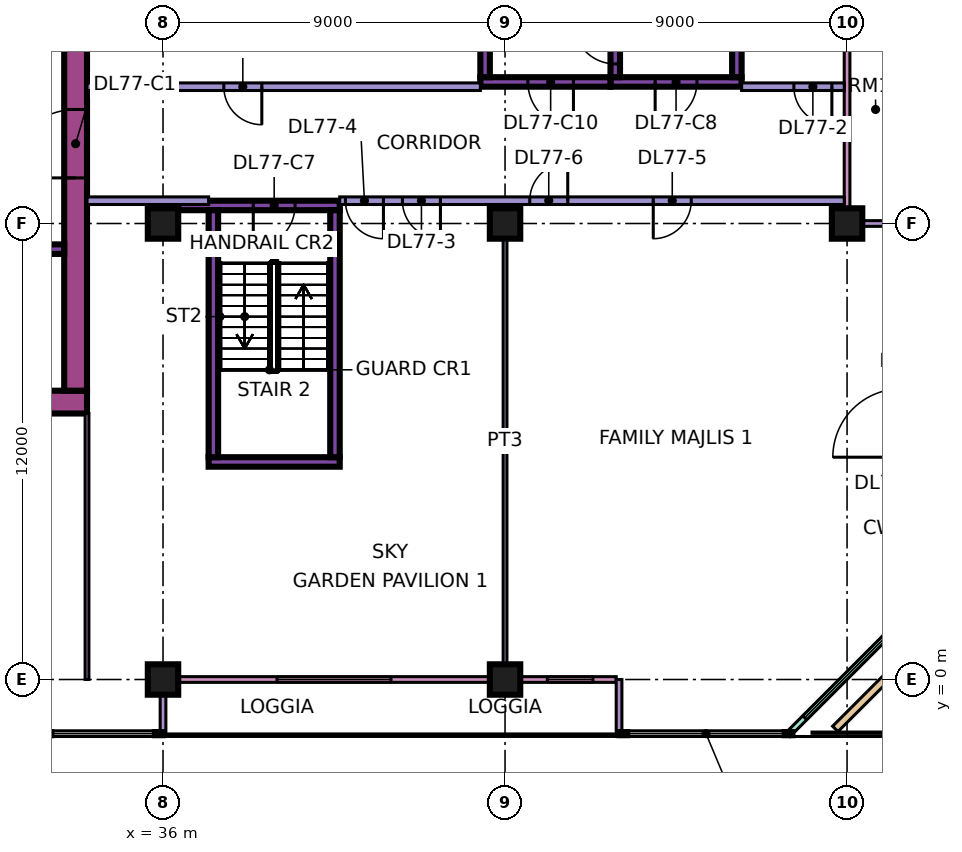
"""IFC4 building model, lengths in metres.
Left out: names, types, materials, properties, quantities, classifications, styles, units other than length and angle.
Written with IfcOpenShell. Run it as: python <this file> out.ifc"""

import sys

from ifc_helpers import new_model, si_unit, direction, frame, frame_2d, origin, origin_2d, place, context, subcontext, project, spatial, rectangle, extrude, element, fill, save


model = new_model("IFC4")
c1 = context("Model", 3, precision=1e-05, world=origin(), true_north=direction((0.0, 1.0)))
c2 = subcontext(c1, "Body", "Model", "MODEL_VIEW")
j1 = project(units=[si_unit("LENGTHUNIT", "METRE"), si_unit("PLANEANGLEUNIT", "RADIAN")], contexts=[c1])
p1 = place(None, origin())
s1 = spatial("IfcSite", under=j1, at=p1, CompositionType="ELEMENT")
p2 = place(p1, origin())
s2 = spatial("IfcBuilding", under=s1, at=p2, CompositionType="ELEMENT")
p3 = place(p2, frame((0.0, 0.0, 327.65)))
s3 = spatial("IfcBuildingStorey", under=s2, at=p3, CompositionType="ELEMENT", Elevation=327.65)
for number, where, z_axis, x_axis in (
    (1, (36.0, 0.0, 0.0), (0.0, 0.0, 1.0), (1.0, 0.0, 0.0)),
    (2, (36.0, 12.0, 0.0), (0.0, 0.0, 1.0), (1.0, 0.0, 0.0)),
    (3, (45.0, 0.0, 0.0), (0.0, 0.0, 1.0), (1.0, 0.0, 0.0)),
    (4, (45.0, 12.0, 0.0), (0.0, 0.0, 1.0), (1.0, 0.0, 0.0)),
    (5, (54.0, 12.0, 0.0), (0.0, 0.0, 1.0), (1.0, 0.0, 0.0)),
):
    element("IfcColumn", number, at=place(p3, frame(where, z_axis=z_axis, x_axis=x_axis)), inside=s3, PredefinedType="COLUMN", context=c2, shape_type="SweptSolid", body=[
        extrude(rectangle(XDim=0.8, YDim=0.8, at=origin_2d()), origin(), (0.0, 0.0, 1.0), 11.25),
    ])
p4 = place(p3, frame((9.0, 7.3, 0.0), z_axis=(0.0, 0.0, 1.0), x_axis=(1.0, 0.0, 0.0)))
e6 = element("IfcWall", 6, at=p4, inside=s3, PredefinedType="SHEAR", context=c2, shape_type="SweptSolid", body=[
    extrude(rectangle(XDim=25.0, YDim=0.6, at=frame_2d((12.5, 0.0))), origin(), (0.0, 0.0, 1.0), 11.25),
])
p5 = place(p3, frame((33.7, 7.6, 0.0), z_axis=(0.0, 0.0, 1.0), x_axis=(0.0, 1.0, 0.0)))
e7 = element("IfcWall", 7, at=p5, inside=s3, PredefinedType="SHEAR", context=c2, shape_type="SweptSolid", body=[
    extrude(rectangle(XDim=11.8, YDim=0.6, at=frame_2d((5.9, 0.0))), origin(), (0.0, 0.0, 1.0), 11.25),
])
p6 = place(p5, frame((5.6, 0.0, 0.0)))
e8 = element("IfcOpeningElement", 8, at=p6, cuts=e7, PredefinedType="OPENING", context=c2, shape_type="SweptSolid", body=[
    extrude(rectangle(XDim=1.8, YDim=2.4, at=frame_2d((0.9, 1.2))), frame((0.0, 0.31, 0.0), z_axis=(0.0, -1.0, 0.0), x_axis=(1.0, 0.0, 0.0)), (0.0, 0.0, 1.0), 0.62),
])
p7 = place(p3, frame((13.45, 11.325, 0.0), z_axis=(0.0, 0.0, 1.0), x_axis=(1.0, 0.0, 0.0)))
e9 = element("IfcWall", 9, at=p7, inside=s3, PredefinedType="SHEAR", context=c2, shape_type="SweptSolid", body=[
    extrude(rectangle(XDim=19.95, YDim=0.25, at=frame_2d((9.975, 0.0))), origin(), (0.0, 0.0, 1.0), 11.25),
])
p8 = place(p7, frame((4.925, 0.0, 0.0)))
e10 = element("IfcOpeningElement", 10, at=p8, cuts=e9, PredefinedType="OPENING", context=c2, shape_type="SweptSolid", body=[
    extrude(rectangle(XDim=0.9, YDim=2.1, at=frame_2d((0.45, 1.05))), frame((0.0, 0.135, 0.0), z_axis=(0.0, -1.0, 0.0), x_axis=(1.0, 0.0, 0.0)), (0.0, 0.0, 1.0), 0.27),
])
p9 = place(p7, frame((12.3, 0.0, 0.0)))
e11 = element("IfcOpeningElement", 11, at=p9, cuts=e9, PredefinedType="OPENING", context=c2, shape_type="SweptSolid", body=[
    extrude(rectangle(XDim=0.9, YDim=2.1, at=frame_2d((0.45, 1.05))), frame((0.0, 0.135, 0.0), z_axis=(0.0, -1.0, 0.0), x_axis=(1.0, 0.0, 0.0)), (0.0, 0.0, 1.0), 0.27),
])
p10 = place(p7, frame((16.775, 0.0, 0.0)))
e12 = element("IfcOpeningElement", 12, at=p10, cuts=e9, PredefinedType="OPENING", context=c2, shape_type="SweptSolid", body=[
    extrude(rectangle(XDim=0.9, YDim=2.1, at=frame_2d((0.45, 1.05))), frame((0.0, 0.135, 0.0), z_axis=(0.0, -1.0, 0.0), x_axis=(1.0, 0.0, 0.0)), (0.0, 0.0, 1.0), 0.27),
])
p11 = place(p3, frame((37.2, 5.725, 0.0), z_axis=(0.0, 0.0, 1.0), x_axis=(1.0, 0.0, 0.0)))
e13 = element("IfcWall", 13, at=p11, inside=s3, PredefinedType="SHEAR", context=c2, shape_type="SweptSolid", body=[
    extrude(rectangle(XDim=3.45, YDim=0.25, at=frame_2d((1.725, 0.0))), origin(), (0.0, 0.0, 1.0), 11.25),
])
p12 = place(p3, frame((36.4, 12.475, 0.0), z_axis=(0.0, 0.0, 1.0), x_axis=(1.0, 0.0, 0.0)))
e14 = element("IfcWall", 14, at=p12, inside=s3, PredefinedType="SHEAR", context=c2, shape_type="SweptSolid", body=[
    extrude(rectangle(XDim=4.25, YDim=0.25, at=frame_2d((2.125, 0.0))), origin(), (0.0, 0.0, 1.0), 11.25),
])
p13 = place(p12, frame((1.975, 0.0, 0.0)))
e15 = element("IfcOpeningElement", 15, at=p13, cuts=e14, PredefinedType="OPENING", context=c2, shape_type="SweptSolid", body=[
    extrude(rectangle(XDim=1.1, YDim=2.2, at=frame_2d((0.55, 1.1))), frame((0.0, 0.135, 0.0), z_axis=(0.0, -1.0, 0.0), x_axis=(1.0, 0.0, 0.0)), (0.0, 0.0, 1.0), 0.27),
])
for number, where, z_axis, x_axis in (
    (16, (37.325, 5.85, 0.0), (0.0, 0.0, 1.0), (0.0, 1.0, 0.0)),
    (17, (40.525, 5.85, 0.0), (0.0, 0.0, 1.0), (0.0, 1.0, 0.0)),
):
    element("IfcWall", number, at=place(p3, frame(where, z_axis=z_axis, x_axis=x_axis)), inside=s3, PredefinedType="SHEAR", context=c2, shape_type="SweptSolid", body=[
        extrude(rectangle(XDim=6.5, YDim=0.25, at=frame_2d((3.25, 0.0))), origin(), (0.0, 0.0, 1.0), 11.25),
    ])
p14 = place(p3, frame((47.775, 15.725, 0.0), z_axis=(0.0, 0.0, 1.0), x_axis=(1.0, 0.0, 0.0)))
e18 = element("IfcWall", 18, at=p14, inside=s3, PredefinedType="SHEAR", context=c2, shape_type="SweptSolid", body=[
    extrude(rectangle(XDim=3.45, YDim=0.25, at=frame_2d((1.725, 0.0))), origin(), (0.0, 0.0, 1.0), 11.25),
])
p15 = place(p14, frame((1.175, 0.0, 0.0)))
e19 = element("IfcOpeningElement", 19, at=p15, cuts=e18, PredefinedType="OPENING", context=c2, shape_type="SweptSolid", body=[
    extrude(rectangle(XDim=1.1, YDim=2.2, at=frame_2d((0.55, 1.1))), frame((0.0, 0.135, 0.0), z_axis=(0.0, -1.0, 0.0), x_axis=(1.0, 0.0, 0.0)), (0.0, 0.0, 1.0), 0.27),
])
p16 = place(p3, frame((47.9, 15.85, 0.0), z_axis=(0.0, 0.0, 1.0), x_axis=(0.0, 1.0, 0.0)))
e20 = element("IfcWall", 20, at=p16, inside=s3, PredefinedType="SHEAR", context=c2, shape_type="SweptSolid", body=[
    extrude(rectangle(XDim=6.5, YDim=0.25, at=frame_2d((3.25, 0.0))), origin(), (0.0, 0.0, 1.0), 11.25),
])
p17 = place(p16, frame((0.35, 0.0, 0.0)))
e21 = element("IfcOpeningElement", 21, at=p17, cuts=e20, PredefinedType="OPENING", context=c2, shape_type="SweptSolid", body=[
    extrude(rectangle(XDim=1.1, YDim=2.2, at=frame_2d((0.55, 1.1))), frame((0.0, 0.135, 0.0), z_axis=(0.0, -1.0, 0.0), x_axis=(1.0, 0.0, 0.0)), (0.0, 0.0, 1.0), 0.27),
])
p18 = place(p3, frame((51.1, 15.85, 0.0), z_axis=(0.0, 0.0, 1.0), x_axis=(0.0, 1.0, 0.0)))
e22 = element("IfcWall", 22, at=p18, inside=s3, PredefinedType="SHEAR", context=c2, shape_type="SweptSolid", body=[
    extrude(rectangle(XDim=6.5, YDim=0.25, at=frame_2d((3.25, 0.0))), origin(), (0.0, 0.0, 1.0), 11.25),
])
p19 = place(p3, frame((44.35, 15.725, 0.0), z_axis=(0.0, 0.0, 1.0), x_axis=(1.0, 0.0, 0.0)))
e23 = element("IfcWall", 23, at=p19, inside=s3, PredefinedType="SHEAR", context=c2, shape_type="SweptSolid", body=[
    extrude(rectangle(XDim=3.425, YDim=0.25, at=frame_2d((1.712, 0.0))), origin(), (0.0, 0.0, 1.0), 11.25),
])
p20 = place(p19, frame((1.25, 0.0, 0.0)))
e24 = element("IfcOpeningElement", 24, at=p20, cuts=e23, PredefinedType="OPENING", context=c2, shape_type="SweptSolid", body=[
    extrude(rectangle(XDim=1.2, YDim=2.2, at=frame_2d((0.6, 1.1))), frame((0.0, 0.135, 0.0), z_axis=(0.0, -1.0, 0.0), x_axis=(1.0, 0.0, 0.0)), (0.0, 0.0, 1.0), 0.27),
])
p21 = place(p3, frame((44.475, 15.85, 0.0), z_axis=(0.0, 0.0, 1.0), x_axis=(0.0, 1.0, 0.0)))
e25 = element("IfcWall", 25, at=p21, inside=s3, PredefinedType="SHEAR", context=c2, shape_type="SweptSolid", body=[
    extrude(rectangle(XDim=6.5, YDim=0.25, at=frame_2d((3.25, 0.0))), origin(), (0.0, 0.0, 1.0), 11.25),
])
p22 = place(p21, frame((1.75, 0.0, 0.0)))
e26 = element("IfcOpeningElement", 26, at=p22, cuts=e25, PredefinedType="OPENING", context=c2, shape_type="SweptSolid", body=[
    extrude(rectangle(XDim=1.1, YDim=2.2, at=frame_2d((0.55, 1.1))), frame((0.0, 0.135, 0.0), z_axis=(0.0, -1.0, 0.0), x_axis=(1.0, 0.0, 0.0)), (0.0, 0.0, 1.0), 0.27),
])
p23 = place(p21, frame((4.3, 0.0, 0.0)))
e27 = element("IfcOpeningElement", 27, at=p23, cuts=e25, PredefinedType="OPENING", context=c2, shape_type="SweptSolid", body=[
    extrude(rectangle(XDim=1.1, YDim=2.2, at=frame_2d((0.55, 1.1))), frame((0.0, 0.135, 0.0), z_axis=(0.0, -1.0, 0.0), x_axis=(1.0, 0.0, 0.0)), (0.0, 0.0, 1.0), 0.27),
])
p24 = place(p3, frame((36.075, 0.0, 0.0), z_axis=(0.0, 0.0, 1.0), x_axis=(1.0, 0.0, 0.0)))
e28 = element("IfcWall", 28, at=p24, inside=s3, PredefinedType="SOLIDWALL", context=c2, shape_type="SweptSolid", body=[
    extrude(rectangle(XDim=11.85, YDim=0.15, at=frame_2d((5.925, 0.0))), origin(), (0.0, 0.0, 1.0), 10.85),
])
p25 = place(p24, frame((2.925, 0.0, 0.45)))
e29 = element("IfcOpeningElement", 29, at=p25, cuts=e28, PredefinedType="OPENING", context=c2, shape_type="SweptSolid", body=[
    extrude(rectangle(XDim=3.0, YDim=9.8, at=frame_2d((1.5, 4.9))), frame((0.0, 0.085, 0.0), z_axis=(0.0, -1.0, 0.0), x_axis=(1.0, 0.0, 0.0)), (0.0, 0.0, 1.0), 0.17),
])
p26 = place(p24, frame((10.038, 0.0, 0.45)))
e30 = element("IfcOpeningElement", 30, at=p26, cuts=e28, PredefinedType="OPENING", context=c2, shape_type="SweptSolid", body=[
    extrude(rectangle(XDim=1.2, YDim=9.8, at=frame_2d((0.6, 4.9))), frame((0.0, 0.085, 0.0), z_axis=(0.0, -1.0, 0.0), x_axis=(1.0, 0.0, 0.0)), (0.0, 0.0, 1.0), 0.17),
])
for number, where, z_axis, x_axis in (
    (31, (36.0, -1.5, 0.0), (0.0, 0.0, 1.0), (0.0, 1.0, 0.0)),
    (32, (48.0, -1.5, 0.0), (0.0, 0.0, 1.0), (0.0, 1.0, 0.0)),
):
    element("IfcWall", number, at=place(p3, frame(where, z_axis=z_axis, x_axis=x_axis)), inside=s3, PredefinedType="SOLIDWALL", context=c2, shape_type="SweptSolid", body=[
        extrude(rectangle(XDim=1.5, YDim=0.15, at=frame_2d((0.75, 0.0))), origin(), (0.0, 0.0, 1.0), 10.85),
    ])
p27 = place(p3, frame((52.447, -1.447, 0.0), z_axis=(0.0, 0.0, 1.0), x_axis=(0.707106781187, 0.707106781187, 0.0)))
e33 = element("IfcWall", 33, at=p27, inside=s3, PredefinedType="SOLIDWALL", context=c2, shape_type="SweptSolid", body=[
    extrude(rectangle(XDim=4.243, YDim=0.15, at=frame_2d((2.121, 0.0))), origin(), (0.0, 0.0, 1.0), 10.85),
])
p28 = place(p27, frame((0.621, 0.0, 0.45)))
e34 = element("IfcOpeningElement", 34, at=p28, cuts=e33, PredefinedType="OPENING", context=c2, shape_type="SweptSolid", body=[
    extrude(rectangle(XDim=3.0, YDim=9.8, at=frame_2d((1.5, 4.9))), frame((0.0, 0.085, 0.0), z_axis=(0.0, -1.0, 0.0), x_axis=(1.0, 0.0, 0.0)), (0.0, 0.0, 1.0), 0.17),
])
p29 = place(p3, frame((54.0, 12.075, 0.0), z_axis=(0.0, 0.0, 1.0), x_axis=(0.0, 1.0, 0.0)))
e35 = element("IfcWall", 35, at=p29, inside=s3, PredefinedType="SOLIDWALL", context=c2, shape_type="SweptSolid", body=[
    extrude(rectangle(XDim=10.35, YDim=0.15, at=frame_2d((5.175, 0.0))), origin(), (0.0, 0.0, 1.0), 10.85),
])
p30 = place(p29, frame((5.438, 0.0, 0.45)))
e36 = element("IfcOpeningElement", 36, at=p30, cuts=e35, PredefinedType="OPENING", context=c2, shape_type="SweptSolid", body=[
    extrude(rectangle(XDim=3.0, YDim=9.8, at=frame_2d((1.5, 4.9))), frame((0.0, 0.085, 0.0), z_axis=(0.0, -1.0, 0.0), x_axis=(1.0, 0.0, 0.0)), (0.0, 0.0, 1.0), 0.17),
])
p31 = place(p3, frame((55.5, 12.0, 0.0), z_axis=(0.0, 0.0, 1.0), x_axis=(-1.0, 0.0, 0.0)))
e37 = element("IfcWall", 37, at=p31, inside=s3, PredefinedType="SOLIDWALL", context=c2, shape_type="SweptSolid", body=[
    extrude(rectangle(XDim=1.5, YDim=0.15, at=frame_2d((0.75, 0.0))), origin(), (0.0, 0.0, 1.0), 10.85),
])
p32 = place(p3, frame((56.2, 1.21, 0.0), z_axis=(0.0, 0.0, 1.0), x_axis=(-0.707106781187, -0.707106781187, 0.0)))
e38 = element("IfcWall", 38, at=p32, inside=s3, PredefinedType="PARAPET", context=c2, shape_type="SweptSolid", body=[
    extrude(rectangle(XDim=3.55, YDim=0.2, at=frame_2d((1.775, 0.0))), origin(), (0.0, 0.0, 1.0), 0.5),
])
p33 = place(p3, frame((34.0, 0.0, 0.0), z_axis=(0.0, 0.0, 1.0), x_axis=(0.0, 1.0, 0.0)))
e39 = element("IfcWall", 39, at=p33, inside=s3, PredefinedType="PARTITIONING", context=c2, shape_type="SweptSolid", body=[
    extrude(rectangle(XDim=7.0, YDim=0.1, at=frame_2d((3.5, 0.0))), origin(), (0.0, 0.0, 1.0), 10.85),
])
p34 = place(p3, frame((34.0, 12.6, 0.0), z_axis=(0.0, 0.0, 1.0), x_axis=(1.0, 0.0, 0.0)))
e40 = element("IfcWall", 40, at=p34, inside=s3, PredefinedType="PARTITIONING", context=c2, shape_type="SweptSolid", body=[
    extrude(rectangle(XDim=3.2, YDim=0.2, at=frame_2d((1.6, 0.0))), origin(), (0.0, 0.0, 1.0), 10.85),
])
p35 = place(p3, frame((34.0, 15.6, 0.0), z_axis=(0.0, 0.0, 1.0), x_axis=(1.0, 0.0, 0.0)))
e41 = element("IfcWall", 41, at=p35, inside=s3, PredefinedType="PARTITIONING", context=c2, shape_type="SweptSolid", body=[
    extrude(rectangle(XDim=10.35, YDim=0.2, at=frame_2d((5.175, 0.0))), origin(), (0.0, 0.0, 1.0), 10.85),
])
p36 = place(p35, frame((3.6, 0.0, 0.0)))
e42 = element("IfcOpeningElement", 42, at=p36, cuts=e41, PredefinedType="OPENING", context=c2, shape_type="SweptSolid", body=[
    extrude(rectangle(XDim=1.0, YDim=2.1, at=frame_2d((0.5, 1.05))), frame((0.0, 0.11, 0.0), z_axis=(0.0, -1.0, 0.0), x_axis=(1.0, 0.0, 0.0)), (0.0, 0.0, 1.0), 0.22),
])
p37 = place(p3, frame((40.65, 12.6, 0.0), z_axis=(0.0, 0.0, 1.0), x_axis=(1.0, 0.0, 0.0)))
e43 = element("IfcWall", 43, at=p37, inside=s3, PredefinedType="PARTITIONING", context=c2, shape_type="SweptSolid", body=[
    extrude(rectangle(XDim=13.276, YDim=0.2, at=frame_2d((6.638, 0.0))), origin(), (0.0, 0.0, 1.0), 10.85),
])
p38 = place(p37, frame((1.65, 0.0, 0.0)))
e44 = element("IfcOpeningElement", 44, at=p38, cuts=e43, PredefinedType="OPENING", context=c2, shape_type="SweptSolid", body=[
    extrude(rectangle(XDim=1.0, YDim=2.1, at=frame_2d((0.5, 1.05))), frame((0.0, 0.11, 0.0), z_axis=(0.0, -1.0, 0.0), x_axis=(1.0, 0.0, 0.0)), (0.0, 0.0, 1.0), 0.22),
])
p39 = place(p37, frame((0.15, 0.0, 0.0)))
e45 = element("IfcOpeningElement", 45, at=p39, cuts=e43, PredefinedType="OPENING", context=c2, shape_type="SweptSolid", body=[
    extrude(rectangle(XDim=1.0, YDim=2.1, at=frame_2d((0.5, 1.05))), frame((0.0, 0.11, 0.0), z_axis=(0.0, -1.0, 0.0), x_axis=(1.0, 0.0, 0.0)), (0.0, 0.0, 1.0), 0.22),
])
p40 = place(p37, frame((8.25, 0.0, 0.0)))
e46 = element("IfcOpeningElement", 46, at=p40, cuts=e43, PredefinedType="OPENING", context=c2, shape_type="SweptSolid", body=[
    extrude(rectangle(XDim=1.0, YDim=2.1, at=frame_2d((0.5, 1.05))), frame((0.0, 0.11, 0.0), z_axis=(0.0, -1.0, 0.0), x_axis=(1.0, 0.0, 0.0)), (0.0, 0.0, 1.0), 0.22),
])
p41 = place(p37, frame((5.0, 0.0, 0.0)))
e47 = element("IfcOpeningElement", 47, at=p41, cuts=e43, PredefinedType="OPENING", context=c2, shape_type="SweptSolid", body=[
    extrude(rectangle(XDim=1.0, YDim=2.1, at=frame_2d((0.5, 1.05))), frame((0.0, 0.11, 0.0), z_axis=(0.0, -1.0, 0.0), x_axis=(1.0, 0.0, 0.0)), (0.0, 0.0, 1.0), 0.22),
])
p42 = place(p3, frame((45.0, 0.074, 0.0), z_axis=(0.0, 0.0, 1.0), x_axis=(0.0, 1.0, 0.0)))
e48 = element("IfcWall", 48, at=p42, inside=s3, PredefinedType="PARTITIONING", context=c2, shape_type="SweptSolid", body=[
    extrude(rectangle(XDim=12.426, YDim=0.1, at=frame_2d((6.213, 0.0))), origin(), (0.0, 0.0, 1.0), 10.85),
])
p43 = place(p3, frame((51.225, 15.6, 0.0), z_axis=(0.0, 0.0, 1.0), x_axis=(1.0, 0.0, 0.0)))
e49 = element("IfcWall", 49, at=p43, inside=s3, PredefinedType="PARTITIONING", context=c2, shape_type="SweptSolid", body=[
    extrude(rectangle(XDim=2.701, YDim=0.2, at=frame_2d((1.351, 0.0))), origin(), (0.0, 0.0, 1.0), 10.85),
])
p44 = place(p43, frame((1.375, 0.0, 0.0)))
e50 = element("IfcOpeningElement", 50, at=p44, cuts=e49, PredefinedType="OPENING", context=c2, shape_type="SweptSolid", body=[
    extrude(rectangle(XDim=1.0, YDim=2.1, at=frame_2d((0.5, 1.05))), frame((0.0, 0.11, 0.0), z_axis=(0.0, -1.0, 0.0), x_axis=(1.0, 0.0, 0.0)), (0.0, 0.0, 1.0), 0.22),
])
p45 = place(p25, origin())
e51 = element("IfcWindow", 51, at=p45, inside=s3, PartitioningType="SINGLE_PANEL", PredefinedType="WINDOW", context=c2, shape_type="SweptSolid", body=[
    extrude(rectangle(XDim=3.0, YDim=9.8, at=frame_2d((1.5, 4.9))), frame((0.0, 0.03, 0.0), z_axis=(0.0, -1.0, 0.0), x_axis=(1.0, 0.0, 0.0)), (0.0, 0.0, 1.0), 0.06),
])
fill(e29, e51)
p46 = place(p26, origin())
e52 = element("IfcWindow", 52, at=p46, inside=s3, PartitioningType="SINGLE_PANEL", PredefinedType="WINDOW", context=c2, shape_type="SweptSolid", body=[
    extrude(rectangle(XDim=1.2, YDim=9.8, at=frame_2d((0.6, 4.9))), frame((0.0, 0.03, 0.0), z_axis=(0.0, -1.0, 0.0), x_axis=(1.0, 0.0, 0.0)), (0.0, 0.0, 1.0), 0.06),
])
fill(e30, e52)
p47 = place(p28, origin())
e53 = element("IfcWindow", 53, at=p47, inside=s3, PartitioningType="SINGLE_PANEL", PredefinedType="WINDOW", context=c2, shape_type="SweptSolid", body=[
    extrude(rectangle(XDim=3.0, YDim=9.8, at=frame_2d((1.5, 4.9))), frame((0.0, 0.03, 0.0), z_axis=(0.0, -1.0, 0.0), x_axis=(1.0, 0.0, 0.0)), (0.0, 0.0, 1.0), 0.06),
])
fill(e34, e53)
p48 = place(p6, origin())
e54 = element("IfcDoor", 54, at=p48, inside=s3, OperationType="DOUBLE_DOOR_SINGLE_SWING", PredefinedType="DOOR", context=c2, shape_type="SweptSolid", body=[
    extrude(rectangle(XDim=1.8, YDim=2.4, at=frame_2d((0.9, 1.2))), frame((0.0, 0.025, 0.0), z_axis=(0.0, -1.0, 0.0), x_axis=(1.0, 0.0, 0.0)), (0.0, 0.0, 1.0), 0.05),
])
fill(e8, e54)
p49 = place(p13, frame((1.1, 0.0, 0.0), z_axis=(0.0, 0.0, 1.0), x_axis=(-1.0, 0.0, 0.0)))
e55 = element("IfcDoor", 55, at=p49, inside=s3, OperationType="SINGLE_SWING_LEFT", PredefinedType="DOOR", context=c2, shape_type="SweptSolid", body=[
    extrude(rectangle(XDim=1.1, YDim=2.2, at=frame_2d((0.55, 1.1))), frame((0.0, 0.025, 0.0), z_axis=(0.0, -1.0, 0.0), x_axis=(1.0, 0.0, 0.0)), (0.0, 0.0, 1.0), 0.05),
])
fill(e15, e55)
p50 = place(p15, frame((1.1, 0.0, 0.0), z_axis=(0.0, 0.0, 1.0), x_axis=(-1.0, 0.0, 0.0)))
e56 = element("IfcDoor", 56, at=p50, inside=s3, OperationType="SINGLE_SWING_LEFT", PredefinedType="DOOR", context=c2, shape_type="SweptSolid", body=[
    extrude(rectangle(XDim=1.1, YDim=2.2, at=frame_2d((0.55, 1.1))), frame((0.0, 0.025, 0.0), z_axis=(0.0, -1.0, 0.0), x_axis=(1.0, 0.0, 0.0)), (0.0, 0.0, 1.0), 0.05),
])
fill(e19, e56)
p51 = place(p20, origin())
e57 = element("IfcDoor", 57, at=p51, inside=s3, OperationType="SINGLE_SWING_RIGHT", PredefinedType="DOOR", context=c2, shape_type="SweptSolid", body=[
    extrude(rectangle(XDim=1.2, YDim=2.2, at=frame_2d((0.6, 1.1))), frame((0.0, 0.025, 0.0), z_axis=(0.0, -1.0, 0.0), x_axis=(1.0, 0.0, 0.0)), (0.0, 0.0, 1.0), 0.05),
])
fill(e24, e57)
p52 = place(p17, frame((1.1, 0.0, 0.0), z_axis=(0.0, 0.0, 1.0), x_axis=(-1.0, 0.0, 0.0)))
e58 = element("IfcDoor", 58, at=p52, inside=s3, OperationType="SINGLE_SWING_RIGHT", PredefinedType="DOOR", context=c2, shape_type="SweptSolid", body=[
    extrude(rectangle(XDim=1.1, YDim=2.2, at=frame_2d((0.55, 1.1))), frame((0.0, 0.025, 0.0), z_axis=(0.0, -1.0, 0.0), x_axis=(1.0, 0.0, 0.0)), (0.0, 0.0, 1.0), 0.05),
])
fill(e21, e58)
p53 = place(p36, origin())
e59 = element("IfcDoor", 59, at=p53, inside=s3, OperationType="SINGLE_SWING_RIGHT", PredefinedType="DOOR", context=c2, shape_type="SweptSolid", body=[
    extrude(rectangle(XDim=1.0, YDim=2.1, at=frame_2d((0.5, 1.05))), frame((0.0, 0.025, 0.0), z_axis=(0.0, -1.0, 0.0), x_axis=(1.0, 0.0, 0.0)), (0.0, 0.0, 1.0), 0.05),
])
fill(e42, e59)
p54 = place(p44, origin())
e60 = element("IfcDoor", 60, at=p54, inside=s3, OperationType="SINGLE_SWING_RIGHT", PredefinedType="DOOR", context=c2, shape_type="SweptSolid", body=[
    extrude(rectangle(XDim=1.0, YDim=2.1, at=frame_2d((0.5, 1.05))), frame((0.0, 0.025, 0.0), z_axis=(0.0, -1.0, 0.0), x_axis=(1.0, 0.0, 0.0)), (0.0, 0.0, 1.0), 0.05),
])
fill(e50, e60)
p55 = place(p38, origin())
e61 = element("IfcDoor", 61, at=p55, inside=s3, OperationType="SINGLE_SWING_RIGHT", PredefinedType="DOOR", context=c2, shape_type="SweptSolid", body=[
    extrude(rectangle(XDim=1.0, YDim=2.1, at=frame_2d((0.5, 1.05))), frame((0.0, 0.025, 0.0), z_axis=(0.0, -1.0, 0.0), x_axis=(1.0, 0.0, 0.0)), (0.0, 0.0, 1.0), 0.05),
])
fill(e44, e61)
p56 = place(p39, origin())
e62 = element("IfcDoor", 62, at=p56, inside=s3, OperationType="SINGLE_SWING_RIGHT", PredefinedType="DOOR", context=c2, shape_type="SweptSolid", body=[
    extrude(rectangle(XDim=1.0, YDim=2.1, at=frame_2d((0.5, 1.05))), frame((0.0, 0.025, 0.0), z_axis=(0.0, -1.0, 0.0), x_axis=(1.0, 0.0, 0.0)), (0.0, 0.0, 1.0), 0.05),
])
fill(e45, e62)
p57 = place(p40, frame((1.0, 0.0, 0.0), z_axis=(0.0, 0.0, 1.0), x_axis=(-1.0, 0.0, 0.0)))
e63 = element("IfcDoor", 63, at=p57, inside=s3, OperationType="SINGLE_SWING_LEFT", PredefinedType="DOOR", context=c2, shape_type="SweptSolid", body=[
    extrude(rectangle(XDim=1.0, YDim=2.1, at=frame_2d((0.5, 1.05))), frame((0.0, 0.025, 0.0), z_axis=(0.0, -1.0, 0.0), x_axis=(1.0, 0.0, 0.0)), (0.0, 0.0, 1.0), 0.05),
])
fill(e46, e63)
p58 = place(p41, frame((1.0, 0.0, 0.0), z_axis=(0.0, 0.0, 1.0), x_axis=(-1.0, 0.0, 0.0)))
e64 = element("IfcDoor", 64, at=p58, inside=s3, OperationType="SINGLE_SWING_RIGHT", PredefinedType="DOOR", context=c2, shape_type="SweptSolid", body=[
    extrude(rectangle(XDim=1.0, YDim=2.1, at=frame_2d((0.5, 1.05))), frame((0.0, 0.025, 0.0), z_axis=(0.0, -1.0, 0.0), x_axis=(1.0, 0.0, 0.0)), (0.0, 0.0, 1.0), 0.05),
])
fill(e47, e64)
save(model, sys.argv[1])
